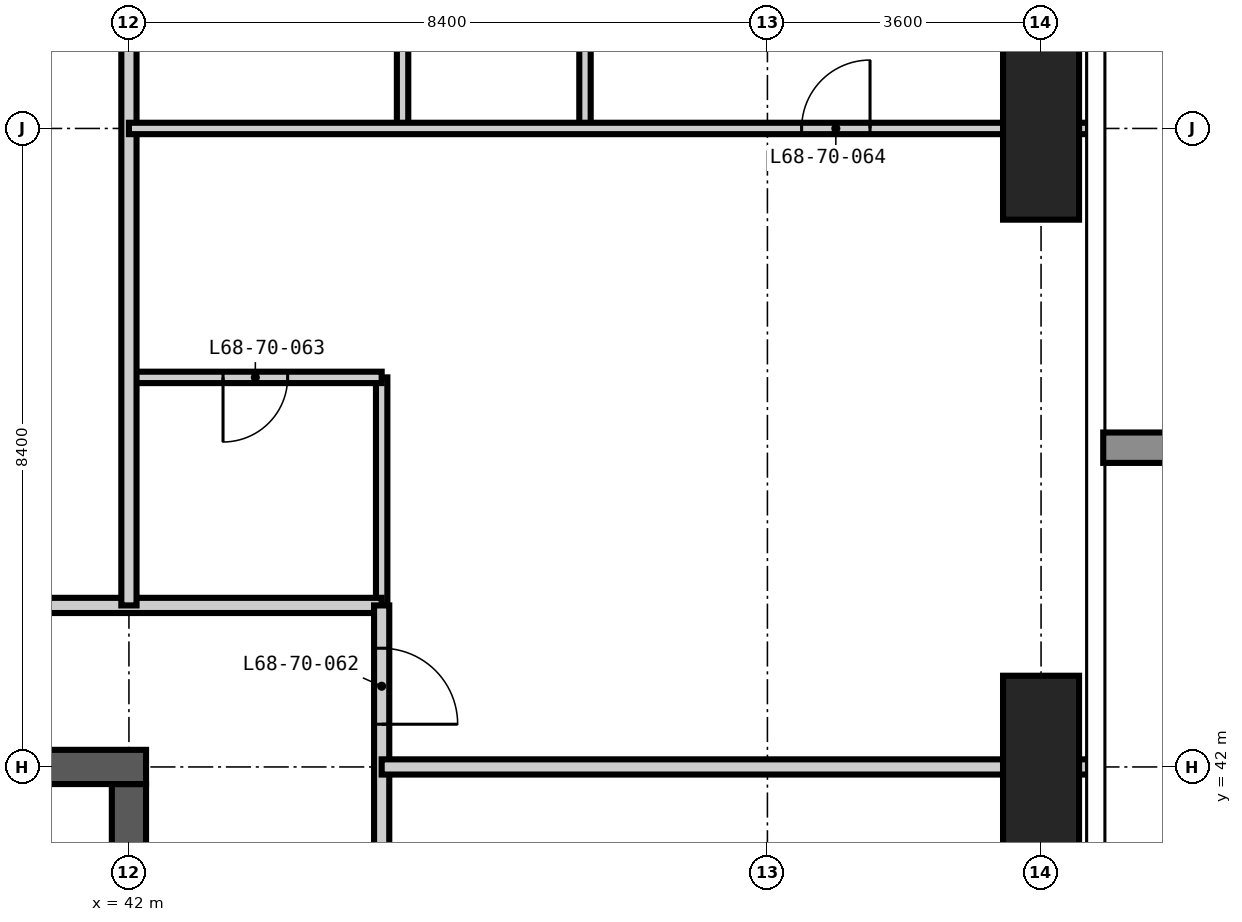
"""IFC4 building model, lengths in metres.
Left out: names, types, materials, properties, quantities, classifications, styles, units other than length and angle.
Written with IfcOpenShell. Run it as: python <this file> out.ifc"""

import sys

from ifc_helpers import new_model, si_unit, direction, frame, frame_2d, origin, origin_2d, place, context, subcontext, project, spatial, rectangle, extrude, element, fill, save


model = new_model("IFC4")
c1 = context("Model", 3, precision=1e-05, world=origin(), true_north=direction((0.0, 1.0)))
c2 = subcontext(c1, "Body", "Model", "MODEL_VIEW")
j1 = project(units=[si_unit("LENGTHUNIT", "METRE"), si_unit("PLANEANGLEUNIT", "RADIAN")], contexts=[c1])
p1 = place(None, origin())
s1 = spatial("IfcSite", under=j1, at=p1, CompositionType="ELEMENT")
p2 = place(p1, origin())
s2 = spatial("IfcBuilding", under=s1, at=p2, CompositionType="ELEMENT")
p3 = place(p2, frame((0.0, 0.0, 264.6)))
s3 = spatial("IfcBuildingStorey", under=s2, at=p3, CompositionType="ELEMENT", Elevation=264.6)
for number, where, z_axis, x_axis in (
    (1, (54.0, 42.0, -0.35), (0.0, 0.0, 1.0), (1.0, 0.0, 0.0)),
    (2, (54.0, 50.4, -0.35), (0.0, 0.0, 1.0), (1.0, 0.0, 0.0)),
):
    element("IfcColumn", number, at=place(p3, frame(where, z_axis=z_axis, x_axis=x_axis)), inside=s3, PredefinedType="COLUMN", context=c2, shape_type="SweptSolid", body=[
        extrude(rectangle(XDim=1.0, YDim=2.4, at=origin_2d()), origin(), (0.0, 0.0, 1.0), 3.9),
    ])
p4 = place(p3, frame((42.0, 17.025, -0.35), z_axis=(0.0, 0.0, 1.0), x_axis=(0.0, 1.0, 0.0)))
e3 = element("IfcWall", 3, at=p4, inside=s3, PredefinedType="SHEAR", context=c2, shape_type="SweptSolid", body=[
    extrude(rectangle(XDim=24.75, YDim=0.45, at=frame_2d((12.375, 0.0))), origin(), (0.0, 0.0, 1.0), 3.9),
])
p5 = place(p4, frame((0.575, 0.0, 0.35)))
e4 = element("IfcOpeningElement", 4, at=p5, cuts=e3, PredefinedType="OPENING", context=c2, shape_type="SweptSolid", body=[
    extrude(rectangle(XDim=1.2, YDim=2.2, at=frame_2d((0.6, 1.1))), frame((0.0, 0.235, 0.0), z_axis=(0.0, -1.0, 0.0), x_axis=(1.0, 0.0, 0.0)), (0.0, 0.0, 1.0), 0.47),
])
p6 = place(p4, frame((11.475, 0.0, 0.35)))
e5 = element("IfcOpeningElement", 5, at=p6, cuts=e3, PredefinedType="OPENING", context=c2, shape_type="SweptSolid", body=[
    extrude(rectangle(XDim=1.8, YDim=2.2, at=frame_2d((0.9, 1.1))), frame((0.0, 0.235, 0.0), z_axis=(0.0, -1.0, 0.0), x_axis=(1.0, 0.0, 0.0)), (0.0, 0.0, 1.0), 0.47),
])
p7 = place(p4, frame((20.275, 0.0, 0.35)))
e6 = element("IfcOpeningElement", 6, at=p7, cuts=e3, PredefinedType="OPENING", context=c2, shape_type="SweptSolid", body=[
    extrude(rectangle(XDim=1.0, YDim=2.1, at=frame_2d((0.5, 1.05))), frame((0.0, 0.235, 0.0), z_axis=(0.0, -1.0, 0.0), x_axis=(1.0, 0.0, 0.0)), (0.0, 0.0, 1.0), 0.47),
])
p8 = place(p3, frame((42.225, 42.0, -0.35), z_axis=(0.0, 0.0, 1.0), x_axis=(-1.0, 0.0, 0.0)))
e7 = element("IfcWall", 7, at=p8, inside=s3, PredefinedType="SHEAR", context=c2, shape_type="SweptSolid", body=[
    extrude(rectangle(XDim=17.25, YDim=0.45, at=frame_2d((8.625, 0.0))), origin(), (0.0, 0.0, 1.0), 3.9),
])
p9 = place(p8, frame((10.125, 0.0, 0.35)))
e8 = element("IfcOpeningElement", 8, at=p9, cuts=e7, PredefinedType="OPENING", context=c2, shape_type="SweptSolid", body=[
    extrude(rectangle(XDim=1.2, YDim=2.2, at=frame_2d((0.6, 1.1))), frame((0.0, 0.235, 0.0), z_axis=(0.0, -1.0, 0.0), x_axis=(1.0, 0.0, 0.0)), (0.0, 0.0, 1.0), 0.47),
])
p10 = place(p3, frame((45.325, 44.125, 0.0), z_axis=(0.0, 0.0, 1.0), x_axis=(0.0, 1.0, 0.0)))
e9 = element("IfcWall", 9, at=p10, inside=s3, PredefinedType="PARTITIONING", context=c2, shape_type="SweptSolid", body=[
    extrude(rectangle(XDim=3.0, YDim=0.15, at=frame_2d((1.5, 0.0))), origin(), (0.0, 0.0, 1.0), 3.55),
])
p11 = place(p3, frame((42.0, 47.125, 0.0), z_axis=(0.0, 0.0, 1.0), x_axis=(1.0, 0.0, 0.0)))
e10 = element("IfcWall", 10, at=p11, inside=s3, PredefinedType="PARTITIONING", context=c2, shape_type="SweptSolid", body=[
    extrude(rectangle(XDim=3.325, YDim=0.15, at=frame_2d((1.663, 0.0))), origin(), (0.0, 0.0, 1.0), 3.55),
])
p12 = place(p11, frame((1.238, 0.0, 0.0)))
e11 = element("IfcOpeningElement", 11, at=p12, cuts=e10, PredefinedType="OPENING", context=c2, shape_type="SweptSolid", body=[
    extrude(rectangle(XDim=0.85, YDim=2.1, at=frame_2d((0.425, 1.05))), frame((0.0, 0.085, 0.0), z_axis=(0.0, -1.0, 0.0), x_axis=(1.0, 0.0, 0.0)), (0.0, 0.0, 1.0), 0.17),
])
p13 = place(p3, frame((22.475, 44.125, 0.0), z_axis=(0.0, 0.0, 1.0), x_axis=(1.0, 0.0, 0.0)))
e12 = element("IfcWall", 12, at=p13, inside=s3, PredefinedType="PARTITIONING", context=c2, shape_type="SweptSolid", body=[
    extrude(rectangle(XDim=22.85, YDim=0.2, at=frame_2d((11.425, 0.0))), origin(), (0.0, 0.0, 1.0), 3.55),
])
p14 = place(p13, frame((4.325, 0.0, 0.0)))
e13 = element("IfcOpeningElement", 13, at=p14, cuts=e12, PredefinedType="OPENING", context=c2, shape_type="SweptSolid", body=[
    extrude(rectangle(XDim=1.0, YDim=2.2, at=frame_2d((0.5, 1.1))), frame((0.0, 0.11, 0.0), z_axis=(0.0, -1.0, 0.0), x_axis=(1.0, 0.0, 0.0)), (0.0, 0.0, 1.0), 0.22),
])
p15 = place(p13, frame((10.625, 0.0, 0.0)))
e14 = element("IfcOpeningElement", 14, at=p15, cuts=e12, PredefinedType="OPENING", context=c2, shape_type="SweptSolid", body=[
    extrude(rectangle(XDim=1.0, YDim=2.2, at=frame_2d((0.5, 1.1))), frame((0.0, 0.11, 0.0), z_axis=(0.0, -1.0, 0.0), x_axis=(1.0, 0.0, 0.0)), (0.0, 0.0, 1.0), 0.22),
])
p16 = place(p13, frame((16.925, 0.0, 0.0)))
e15 = element("IfcOpeningElement", 15, at=p16, cuts=e12, PredefinedType="OPENING", context=c2, shape_type="SweptSolid", body=[
    extrude(rectangle(XDim=1.0, YDim=2.2, at=frame_2d((0.5, 1.1))), frame((0.0, 0.11, 0.0), z_axis=(0.0, -1.0, 0.0), x_axis=(1.0, 0.0, 0.0)), (0.0, 0.0, 1.0), 0.22),
])
p17 = place(p3, frame((45.325, 44.125, 0.0), z_axis=(0.0, 0.0, 1.0), x_axis=(0.0, -1.0, 0.0)))
e16 = element("IfcWall", 16, at=p17, inside=s3, PredefinedType="PARTITIONING", context=c2, shape_type="SweptSolid", body=[
    extrude(rectangle(XDim=6.325, YDim=0.2, at=frame_2d((3.163, 0.0))), origin(), (0.0, 0.0, 1.0), 3.55),
])
p18 = place(p17, frame((3.725, 0.0, 0.0)))
e17 = element("IfcOpeningElement", 17, at=p18, cuts=e16, PredefinedType="OPENING", context=c2, shape_type="SweptSolid", body=[
    extrude(rectangle(XDim=1.0, YDim=2.2, at=frame_2d((0.5, 1.1))), frame((0.0, 0.11, 0.0), z_axis=(0.0, -1.0, 0.0), x_axis=(1.0, 0.0, 0.0)), (0.0, 0.0, 1.0), 0.22),
])
p19 = place(p17, frame((0.563, 0.0, 0.0)))
e18 = element("IfcOpeningElement", 18, at=p19, cuts=e16, PredefinedType="OPENING", context=c2, shape_type="SweptSolid", body=[
    extrude(rectangle(XDim=1.0, YDim=2.2, at=frame_2d((0.5, 1.1))), frame((0.0, 0.11, 0.0), z_axis=(0.0, -1.0, 0.0), x_axis=(1.0, 0.0, 0.0)), (0.0, 0.0, 1.0), 0.22),
])
p20 = place(p3, frame((42.0, 44.125, 0.0), z_axis=(0.0, 0.0, 1.0), x_axis=(0.0, 1.0, 0.0)))
e19 = element("IfcWall", 19, at=p20, inside=s3, PredefinedType="PARTITIONING", context=c2, shape_type="SweptSolid", body=[
    extrude(rectangle(XDim=10.493, YDim=0.2, at=frame_2d((5.247, 0.0))), origin(), (0.0, 0.0, 1.0), 3.55),
])
p21 = place(p3, frame((45.325, 42.0, 0.0), z_axis=(0.0, 0.0, 1.0), x_axis=(1.0, 0.0, 0.0)))
e20 = element("IfcWall", 20, at=p21, inside=s3, PredefinedType="PARTITIONING", context=c2, shape_type="SweptSolid", body=[
    extrude(rectangle(XDim=9.293, YDim=0.2, at=frame_2d((4.646, 0.0))), origin(), (0.0, 0.0, 1.0), 3.55),
])
p22 = place(p3, frame((45.6, 50.4, 0.0), z_axis=(0.0, 0.0, 1.0), x_axis=(0.0, 1.0, 0.0)))
e21 = element("IfcWall", 21, at=p22, inside=s3, PredefinedType="PARTITIONING", context=c2, shape_type="SweptSolid", body=[
    extrude(rectangle(XDim=3.0, YDim=0.15, at=frame_2d((1.5, 0.0))), origin(), (0.0, 0.0, 1.0), 3.55),
])
p23 = place(p3, frame((48.0, 50.4, 0.0), z_axis=(0.0, 0.0, 1.0), x_axis=(0.0, 1.0, 0.0)))
e22 = element("IfcWall", 22, at=p23, inside=s3, PredefinedType="PARTITIONING", context=c2, shape_type="SweptSolid", body=[
    extrude(rectangle(XDim=3.0, YDim=0.15, at=frame_2d((1.5, 0.0))), origin(), (0.0, 0.0, 1.0), 3.55),
])
p24 = place(p23, frame((1.05, 0.0, 0.0)))
e23 = element("IfcOpeningElement", 23, at=p24, cuts=e22, PredefinedType="OPENING", context=c2, shape_type="SweptSolid", body=[
    extrude(rectangle(XDim=0.9, YDim=2.1, at=frame_2d((0.45, 1.05))), frame((0.0, 0.085, 0.0), z_axis=(0.0, -1.0, 0.0), x_axis=(1.0, 0.0, 0.0)), (0.0, 0.0, 1.0), 0.17),
])
p25 = place(p3, frame((42.0, 50.4, 0.0), z_axis=(0.0, 0.0, 1.0), x_axis=(1.0, 0.0, 0.0)))
e24 = element("IfcWall", 24, at=p25, inside=s3, PredefinedType="PARTITIONING", context=c2, shape_type="SweptSolid", body=[
    extrude(rectangle(XDim=12.618, YDim=0.15, at=frame_2d((6.309, 0.0))), origin(), (0.0, 0.0, 1.0), 3.55),
])
p26 = place(p25, frame((8.85, 0.0, 0.0)))
e25 = element("IfcOpeningElement", 25, at=p26, cuts=e24, PredefinedType="OPENING", context=c2, shape_type="SweptSolid", body=[
    extrude(rectangle(XDim=0.9, YDim=2.1, at=frame_2d((0.45, 1.05))), frame((0.0, 0.085, 0.0), z_axis=(0.0, -1.0, 0.0), x_axis=(1.0, 0.0, 0.0)), (0.0, 0.0, 1.0), 0.17),
])
p27 = place(p19, origin())
e26 = element("IfcDoor", 26, at=p27, inside=s3, OperationType="SINGLE_SWING_RIGHT", PredefinedType="DOOR", context=c2, shape_type="SweptSolid", body=[
    extrude(rectangle(XDim=1.0, YDim=2.2, at=frame_2d((0.5, 1.1))), frame((0.0, 0.025, 0.0), z_axis=(0.0, -1.0, 0.0), x_axis=(1.0, 0.0, 0.0)), (0.0, 0.0, 1.0), 0.05),
])
fill(e18, e26)
p28 = place(p12, frame((0.85, 0.0, 0.0), z_axis=(0.0, 0.0, 1.0), x_axis=(-1.0, 0.0, 0.0)))
e27 = element("IfcDoor", 27, at=p28, inside=s3, OperationType="SINGLE_SWING_RIGHT", PredefinedType="DOOR", context=c2, shape_type="SweptSolid", body=[
    extrude(rectangle(XDim=0.85, YDim=2.1, at=frame_2d((0.425, 1.05))), frame((0.0, 0.025, 0.0), z_axis=(0.0, -1.0, 0.0), x_axis=(1.0, 0.0, 0.0)), (0.0, 0.0, 1.0), 0.05),
])
fill(e11, e27)
p29 = place(p26, origin())
e28 = element("IfcDoor", 28, at=p29, inside=s3, OperationType="SINGLE_SWING_RIGHT", PredefinedType="DOOR", context=c2, shape_type="SweptSolid", body=[
    extrude(rectangle(XDim=0.9, YDim=2.1, at=frame_2d((0.45, 1.05))), frame((0.0, 0.025, 0.0), z_axis=(0.0, -1.0, 0.0), x_axis=(1.0, 0.0, 0.0)), (0.0, 0.0, 1.0), 0.05),
])
fill(e25, e28)
save(model, sys.argv[1])
